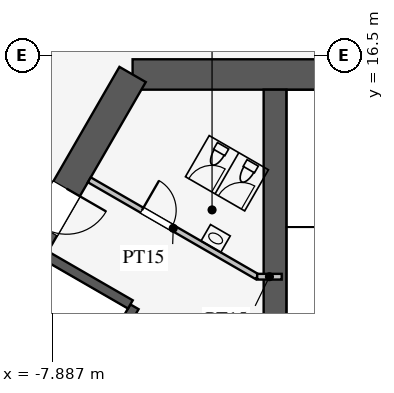
"""IFC4 building model, lengths in metres.
Left out: names, types, materials, properties, quantities, classifications, styles, units other than length and angle.
Written with IfcOpenShell. Run it as: python <this file> out.ifc"""

import sys

from ifc_helpers import new_model, si_unit, direction, frame, frame_2d, origin, place, context, subcontext, project, spatial, rectangle, extrude, element, fill, save


model = new_model("IFC4")
c1 = context("Model", 3, precision=1e-05, world=origin(), true_north=direction((0.0, 1.0)))
c2 = subcontext(c1, "Body", "Model", "MODEL_VIEW")
j1 = project(units=[si_unit("LENGTHUNIT", "METRE"), si_unit("PLANEANGLEUNIT", "RADIAN")], contexts=[c1])
p1 = place(None, origin())
s1 = spatial("IfcSite", under=j1, at=p1, CompositionType="ELEMENT")
p2 = place(p1, origin())
s2 = spatial("IfcBuilding", under=s1, at=p2, CompositionType="ELEMENT")
p3 = place(p2, frame((0.0, 0.0, 145.1)))
s3 = spatial("IfcBuildingStorey", under=s2, at=p3, CompositionType="ELEMENT", Elevation=145.1)
p4 = place(p3, frame((5.773, 16.0, 0.0), z_axis=(0.0, 0.0, 1.0), x_axis=(-1.0, 0.0, 0.0)))
e1 = element("IfcWall", 1, at=p4, inside=s3, PredefinedType="SHEAR", context=c2, shape_type="SweptSolid", body=[
    extrude(rectangle(XDim=11.547, YDim=0.8, at=frame_2d((5.773, 0.0))), origin(), (0.0, 0.0, 1.0), 4.2),
])
p5 = place(p3, frame((-5.773, 16.0, 0.0), z_axis=(0.0, 0.0, 1.0), x_axis=(-0.500002442456, -0.866023993627, 0.0)))
e2 = element("IfcWall", 2, at=p5, inside=s3, PredefinedType="SHEAR", context=c2, shape_type="SweptSolid", body=[
    extrude(rectangle(XDim=21.939, YDim=0.8, at=frame_2d((10.97, 0.0))), origin(), (0.0, 0.0, 1.0), 4.2),
])
p6 = place(p5, frame((17.27, 0.0, 0.0)))
e3 = element("IfcOpeningElement", 3, at=p6, cuts=e2, PredefinedType="OPENING", context=c2, shape_type="SweptSolid", body=[
    extrude(rectangle(XDim=1.2, YDim=2.1, at=frame_2d((0.6, 1.05))), frame((0.0, 0.41, 0.0), z_axis=(0.0, -1.0, 0.0), x_axis=(1.0, 0.0, 0.0)), (0.0, 0.0, 1.0), 0.82),
])
p7 = place(p5, frame((3.47, 0.0, 0.0)))
e4 = element("IfcOpeningElement", 4, at=p7, cuts=e2, PredefinedType="OPENING", context=c2, shape_type="SweptSolid", body=[
    extrude(rectangle(XDim=1.2, YDim=2.1, at=frame_2d((0.6, 1.05))), frame((0.0, 0.41, 0.0), z_axis=(0.0, -1.0, 0.0), x_axis=(1.0, 0.0, 0.0)), (0.0, 0.0, 1.0), 0.82),
])
p8 = place(p3, frame((-5.724, 9.886, 0.0), z_axis=(0.0, 0.0, 1.0), x_axis=(-0.500001763848, -0.866024385424, 0.0)))
e5 = element("IfcWall", 5, at=p8, inside=s3, PredefinedType="SHEAR", context=c2, shape_type="SweptSolid", body=[
    extrude(rectangle(XDim=11.4, YDim=0.25, at=frame_2d((5.7, 0.0))), origin(), (0.0, 0.0, 1.0), 4.2),
])
p9 = place(p8, frame((6.525, 0.0, 0.0)))
e6 = element("IfcOpeningElement", 6, at=p9, cuts=e5, PredefinedType="OPENING", context=c2, shape_type="SweptSolid", body=[
    extrude(rectangle(XDim=1.2, YDim=2.2, at=frame_2d((0.6, 1.1))), frame((0.0, 0.135, 0.0), z_axis=(0.0, -1.0, 0.0), x_axis=(1.0, 0.0, 0.0)), (0.0, 0.0, 1.0), 0.27),
])
p10 = place(p8, frame((9.375, 0.0, 0.0)))
e7 = element("IfcOpeningElement", 7, at=p10, cuts=e5, PredefinedType="OPENING", context=c2, shape_type="SweptSolid", body=[
    extrude(rectangle(XDim=1.2, YDim=2.2, at=frame_2d((0.6, 1.1))), frame((0.0, 0.135, 0.0), z_axis=(0.0, -1.0, 0.0), x_axis=(1.0, 0.0, 0.0)), (0.0, 0.0, 1.0), 0.27),
])
p11 = place(p3, frame((-5.832, 9.949, 0.0), z_axis=(0.0, 0.0, 1.0), x_axis=(-0.866029291668, 0.499993265928, 0.0)))
e8 = element("IfcWall", 8, at=p11, inside=s3, PredefinedType="SHEAR", context=c2, shape_type="SweptSolid", body=[
    extrude(rectangle(XDim=2.575, YDim=0.25, at=frame_2d((1.288, 0.0))), origin(), (0.0, 0.0, 1.0), 4.2),
])
p12 = place(p3, frame((-2.025, 6.525, 0.0), z_axis=(0.0, 0.0, 1.0), x_axis=(0.0, 1.0, 0.0)))
e9 = element("IfcWall", 9, at=p12, inside=s3, PredefinedType="SHEAR", context=c2, shape_type="SweptSolid", body=[
    extrude(rectangle(XDim=9.075, YDim=0.6, at=frame_2d((4.538, 0.0))), origin(), (0.0, 0.0, 1.0), 4.2),
])
p13 = place(p3, frame((-2.495, 10.678, 0.0), z_axis=(0.0, 0.0, 1.0), x_axis=(-0.86602216432, 0.500005610874, 0.0)))
e10 = element("IfcWall", 10, at=p13, inside=s3, PredefinedType="PARTITIONING", context=c2, shape_type="SweptSolid", body=[
    extrude(rectangle(XDim=5.1, YDim=0.15, at=frame_2d((2.55, 0.0))), origin(), (0.0, 0.0, 1.0), 4.0),
])
p14 = place(p13, frame((2.6, 0.0, 0.0)))
e11 = element("IfcOpeningElement", 11, at=p14, cuts=e10, PredefinedType="OPENING", context=c2, shape_type="SweptSolid", body=[
    extrude(rectangle(XDim=0.9, YDim=2.1, at=frame_2d((0.45, 1.05))), frame((0.0, 0.085, 0.0), z_axis=(0.0, -1.0, 0.0), x_axis=(1.0, 0.0, 0.0)), (0.0, 0.0, 1.0), 0.17),
])
p15 = place(p3, frame((-2.495, 10.678, 0.0), z_axis=(0.0, 0.0, 1.0), x_axis=(1.0, 0.0, 0.0)))
e12 = element("IfcWall", 12, at=p15, inside=s3, PredefinedType="PARTITIONING", context=c2, shape_type="SweptSolid", body=[
    extrude(rectangle(XDim=0.645, YDim=0.15, at=frame_2d((0.323, 0.0))), origin(), (0.0, 0.0, 1.0), 4.0),
])
p16 = place(p3, frame((-0.016, 30.491, 0.0), z_axis=(0.0, 0.0, 1.0), x_axis=(-0.50000091641, -0.866024874695, 0.0)))
e13 = element("IfcWall", 13, at=p16, inside=s3, PredefinedType="PARTITIONING", context=c2, shape_type="SweptSolid", body=[
    extrude(rectangle(XDim=52.796, YDim=0.12, at=frame_2d((26.398, 0.0))), origin(), (0.0, 0.0, 1.0), 2.9),
])
p17 = place(p16, frame((10.2, 0.0, 0.15)))
e14 = element("IfcOpeningElement", 14, at=p17, cuts=e13, PredefinedType="OPENING", context=c2, shape_type="SweptSolid", body=[
    extrude(rectangle(XDim=1.8, YDim=2.1, at=frame_2d((0.9, 1.05))), frame((0.0, 0.07, 0.0), z_axis=(0.0, -1.0, 0.0), x_axis=(1.0, 0.0, 0.0)), (0.0, 0.0, 1.0), 0.14),
])
p18 = place(p16, frame((40.8, 0.0, 0.15)))
e15 = element("IfcOpeningElement", 15, at=p18, cuts=e13, PredefinedType="OPENING", context=c2, shape_type="SweptSolid", body=[
    extrude(rectangle(XDim=1.8, YDim=2.1, at=frame_2d((0.9, 1.05))), frame((0.0, 0.07, 0.0), z_axis=(0.0, -1.0, 0.0), x_axis=(1.0, 0.0, 0.0)), (0.0, 0.0, 1.0), 0.14),
])
p19 = place(p14, frame((0.9, 0.0, 0.0), z_axis=(0.0, 0.0, 1.0), x_axis=(-1.0, 0.0, 0.0)))
e16 = element("IfcDoor", 16, at=p19, inside=s3, OperationType="SINGLE_SWING_LEFT", PredefinedType="DOOR", context=c2, shape_type="SweptSolid", body=[
    extrude(rectangle(XDim=0.9, YDim=2.1, at=frame_2d((0.45, 1.05))), frame((0.0, 0.025, 0.0), z_axis=(0.0, -1.0, 0.0), x_axis=(1.0, 0.0, 0.0)), (0.0, 0.0, 1.0), 0.05),
])
fill(e11, e16)
p20 = place(p7, origin())
e17 = element("IfcDoor", 17, at=p20, inside=s3, OperationType="SINGLE_SWING_LEFT", PredefinedType="DOOR", context=c2, shape_type="SweptSolid", body=[
    extrude(rectangle(XDim=1.2, YDim=2.1, at=frame_2d((0.6, 1.05))), frame((0.0, 0.025, 0.0), z_axis=(0.0, -1.0, 0.0), x_axis=(1.0, 0.0, 0.0)), (0.0, 0.0, 1.0), 0.05),
])
fill(e4, e17)
save(model, sys.argv[1])
